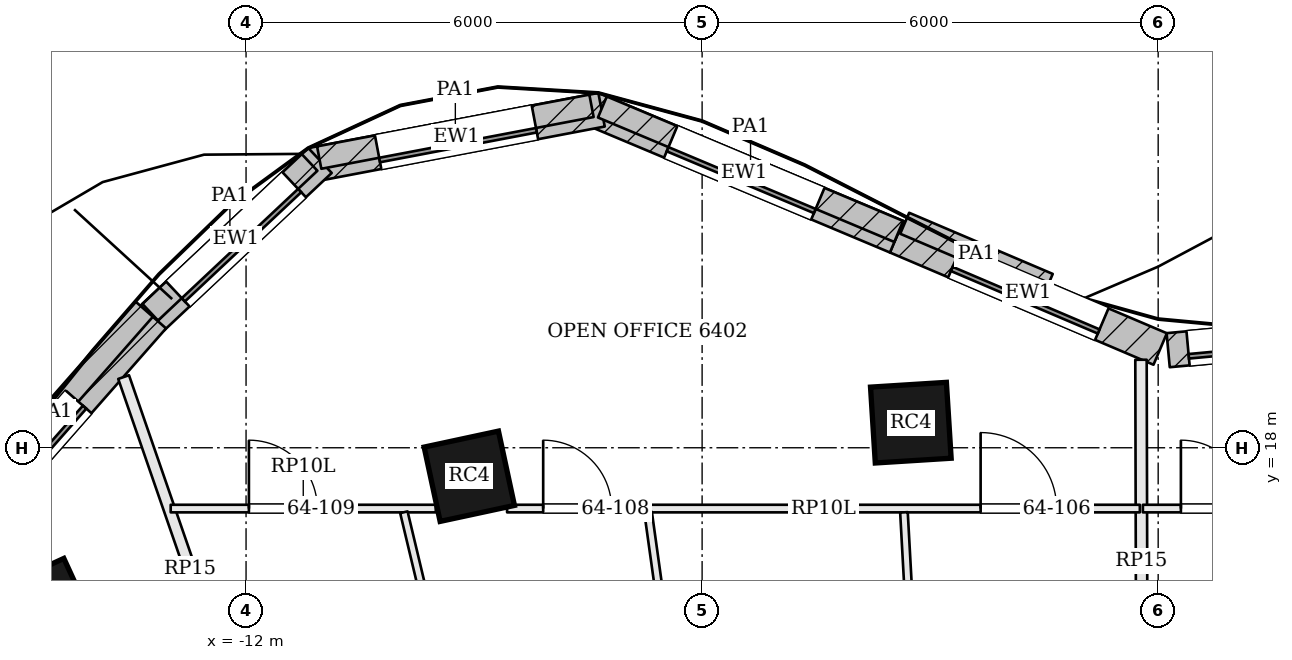
"""IFC4 building model, lengths in metres.
Left out: names, types, materials, properties, quantities, classifications, styles, units other than length and angle.
Written with IfcOpenShell. Run it as: python <this file> out.ifc"""

import sys

from ifc_helpers import new_model, si_unit, direction, frame, frame_2d, origin, origin_2d, place, context, subcontext, project, spatial, rectangle, extrude, element, fill, save


model = new_model("IFC4")
c1 = context("Model", 3, precision=1e-05, world=origin(), true_north=direction((0.0, 1.0)))
c2 = subcontext(c1, "Body", "Model", "MODEL_VIEW")
j1 = project(units=[si_unit("LENGTHUNIT", "METRE"), si_unit("PLANEANGLEUNIT", "RADIAN")], contexts=[c1])
p1 = place(None, origin())
s1 = spatial("IfcSite", under=j1, at=p1, CompositionType="ELEMENT")
p2 = place(p1, origin())
s2 = spatial("IfcBuilding", under=s1, at=p2, CompositionType="ELEMENT")
p3 = place(p2, frame((0.0, 0.0, 260.4)))
s3 = spatial("IfcBuildingStorey", under=s2, at=p3, CompositionType="ELEMENT", Elevation=260.4)
for number, where, z_axis, x_axis in (
    (1, (-3.254, 18.33, 0.0), (0.0, 0.0, 1.0), (-0.998, -0.063, 0.0)),
    (2, (-9.063, 17.625, 0.0), (0.0, 0.0, 1.0), (-0.978, -0.21, 0.0)),
    (3, (-14.643, 15.881, 0.0), (0.0, 0.0, 1.0), (-0.909, -0.417, 0.0)),
):
    element("IfcColumn", number, at=place(p3, frame(where, z_axis=z_axis, x_axis=x_axis)), inside=s3, PredefinedType="COLUMN", context=c2, shape_type="SweptSolid", body=[
        extrude(rectangle(XDim=1.0, YDim=1.0, at=origin_2d()), origin(), (0.0, 0.0, 1.0), 3.1),
    ])
p4 = place(p3, frame((2.745, 19.525, 0.0), z_axis=(0.0, 0.0, 1.0), x_axis=(-0.995768774275, -0.091894222771, 0.0)))
e4 = element("IfcWall", 4, at=p4, inside=s3, PredefinedType="SOLIDWALL", context=c2, shape_type="SweptSolid", body=[
    extrude(rectangle(XDim=2.625, YDim=0.45, at=frame_2d((1.312, 0.0))), origin(), (0.0, 0.0, 1.0), 3.6),
])
p5 = place(p4, frame((0.262, 0.0, 0.9)))
e5 = element("IfcOpeningElement", 5, at=p5, cuts=e4, PredefinedType="OPENING", context=c2, shape_type="SweptSolid", body=[
    extrude(rectangle(XDim=2.1, YDim=1.8, at=frame_2d((1.05, 0.9))), frame((0.0, 0.235, 0.0), z_axis=(0.0, -1.0, 0.0), x_axis=(1.0, 0.0, 0.0)), (0.0, 0.0, 1.0), 0.47),
])
p6 = place(p3, frame((0.026, 19.299, 0.0), z_axis=(0.0, 0.0, 1.0), x_axis=(-0.920040408927, 0.391823488245, 0.0)))
e6 = element("IfcWall", 6, at=p6, inside=s3, PredefinedType="SOLIDWALL", context=c2, shape_type="SweptSolid", body=[
    extrude(rectangle(XDim=3.77, YDim=0.45, at=frame_2d((1.885, 0.0))), origin(), (0.0, 0.0, 1.0), 3.6),
])
p7 = place(p6, frame((0.835, 0.0, 0.9)))
e7 = element("IfcOpeningElement", 7, at=p7, cuts=e6, PredefinedType="OPENING", context=c2, shape_type="SweptSolid", body=[
    extrude(rectangle(XDim=2.1, YDim=1.8, at=frame_2d((1.05, 0.9))), frame((0.0, 0.235, 0.0), z_axis=(0.0, -1.0, 0.0), x_axis=(1.0, 0.0, 0.0)), (0.0, 0.0, 1.0), 0.47),
])
p8 = place(p3, frame((-3.441, 20.776, 0.0), z_axis=(0.0, 0.0, 1.0), x_axis=(-0.921988121387, 0.387218160758, 0.0)))
e8 = element("IfcWall", 8, at=p8, inside=s3, PredefinedType="SOLIDWALL", context=c2, shape_type="SweptSolid", body=[
    extrude(rectangle(XDim=4.347, YDim=0.45, at=frame_2d((2.173, 0.0))), origin(), (0.0, 0.0, 1.0), 3.6),
])
p9 = place(p8, frame((1.123, 0.0, 0.9)))
e9 = element("IfcOpeningElement", 9, at=p9, cuts=e8, PredefinedType="OPENING", context=c2, shape_type="SweptSolid", body=[
    extrude(rectangle(XDim=2.1, YDim=1.8, at=frame_2d((1.05, 0.9))), frame((0.0, 0.235, 0.0), z_axis=(0.0, -1.0, 0.0), x_axis=(1.0, 0.0, 0.0)), (0.0, 0.0, 1.0), 0.47),
])
p10 = place(p3, frame((-7.323, 22.447, 0.0), z_axis=(0.0, 0.0, 1.0), x_axis=(-0.982420993638, -0.18667884524, 0.0)))
e10 = element("IfcWall", 10, at=p10, inside=s3, PredefinedType="SOLIDWALL", context=c2, shape_type="SweptSolid", body=[
    extrude(rectangle(XDim=3.884, YDim=0.45, at=frame_2d((1.942, 0.0))), origin(), (0.0, 0.0, 1.0), 3.6),
])
p11 = place(p10, frame((0.892, 0.0, 0.9)))
e11 = element("IfcOpeningElement", 11, at=p11, cuts=e10, PredefinedType="OPENING", context=c2, shape_type="SweptSolid", body=[
    extrude(rectangle(XDim=2.1, YDim=1.8, at=frame_2d((1.05, 0.9))), frame((0.0, 0.235, 0.0), z_axis=(0.0, -1.0, 0.0), x_axis=(1.0, 0.0, 0.0)), (0.0, 0.0, 1.0), 0.47),
])
p12 = place(p3, frame((-11.027, 21.779, 0.0), z_axis=(0.0, 0.0, 1.0), x_axis=(-0.728871214251, -0.684650825631, 0.0)))
e12 = element("IfcWall", 12, at=p12, inside=s3, PredefinedType="SOLIDWALL", context=c2, shape_type="SweptSolid", body=[
    extrude(rectangle(XDim=3.031, YDim=0.45, at=frame_2d((1.516, 0.0))), origin(), (0.0, 0.0, 1.0), 3.6),
])
p13 = place(p12, frame((0.466, 0.0, 0.9)))
e13 = element("IfcOpeningElement", 13, at=p13, cuts=e12, PredefinedType="OPENING", context=c2, shape_type="SweptSolid", body=[
    extrude(rectangle(XDim=2.1, YDim=1.8, at=frame_2d((1.05, 0.9))), frame((0.0, 0.235, 0.0), z_axis=(0.0, -1.0, 0.0), x_axis=(1.0, 0.0, 0.0)), (0.0, 0.0, 1.0), 0.47),
])
p14 = place(p3, frame((-13.221, 19.719, 0.0), z_axis=(0.0, 0.0, 1.0), x_axis=(-0.660424908916, -0.750892095899, 0.0)))
e14 = element("IfcWall", 14, at=p14, inside=s3, PredefinedType="SOLIDWALL", context=c2, shape_type="SweptSolid", body=[
    extrude(rectangle(XDim=5.071, YDim=0.45, at=frame_2d((2.535, 0.0))), origin(), (0.0, 0.0, 1.0), 3.6),
])
p15 = place(p14, frame((1.485, 0.0, 0.9)))
e15 = element("IfcOpeningElement", 15, at=p15, cuts=e14, PredefinedType="OPENING", context=c2, shape_type="SweptSolid", body=[
    extrude(rectangle(XDim=2.1, YDim=1.8, at=frame_2d((1.05, 0.9))), frame((0.0, 0.235, 0.0), z_axis=(0.0, -1.0, 0.0), x_axis=(1.0, 0.0, 0.0)), (0.0, 0.0, 1.0), 0.47),
])
p16 = place(p3, frame((-1.446, 20.149, 3.9), z_axis=(0.0, 0.0, 1.0), x_axis=(-0.920058903695, 0.391780057854, 0.0)))
e16 = element("IfcWall", 16, at=p16, inside=s3, PredefinedType="PARAPET", context=c2, shape_type="SweptSolid", body=[
    extrude(rectangle(XDim=2.053, YDim=0.3, at=frame_2d((1.027, 0.0))), origin(), (0.0, 0.0, 1.0), 1.1),
])
p17 = place(p3, frame((-3.413, 20.846, 3.9), z_axis=(0.0, 0.0, 1.0), x_axis=(-0.921981693349, 0.387233465921, 0.0)))
e17 = element("IfcWall", 17, at=p17, inside=s3, PredefinedType="PARAPET", context=c2, shape_type="SweptSolid", body=[
    extrude(rectangle(XDim=4.229, YDim=0.3, at=frame_2d((2.114, 0.0))), origin(), (0.0, 0.0, 1.0), 1.1),
])
p18 = place(p3, frame((-7.455, 22.498, 3.9), z_axis=(0.0, 0.0, 1.0), x_axis=(-0.982412909305, -0.186721385038, 0.0)))
e18 = element("IfcWall", 18, at=p18, inside=s3, PredefinedType="PARAPET", context=c2, shape_type="SweptSolid", body=[
    extrude(rectangle(XDim=3.647, YDim=0.3, at=frame_2d((1.823, 0.0))), origin(), (0.0, 0.0, 1.0), 1.1),
])
p19 = place(p3, frame((-11.164, 21.753, 3.9), z_axis=(0.0, 0.0, 1.0), x_axis=(-0.72886475222, -0.684657704967, 0.0)))
e19 = element("IfcWall", 19, at=p19, inside=s3, PredefinedType="PARAPET", context=c2, shape_type="SweptSolid", body=[
    extrude(rectangle(XDim=2.877, YDim=0.3, at=frame_2d((1.438, 0.0))), origin(), (0.0, 0.0, 1.0), 1.1),
])
p20 = place(p3, frame((-13.339, 19.822, 3.9), z_axis=(0.0, 0.0, 1.0), x_axis=(-0.660443655688, -0.750875607316, 0.0)))
e20 = element("IfcWall", 20, at=p20, inside=s3, PredefinedType="PARAPET", context=c2, shape_type="SweptSolid", body=[
    extrude(rectangle(XDim=3.615, YDim=0.3, at=frame_2d((1.808, 0.0))), origin(), (0.0, 0.0, 1.0), 1.1),
])
p21 = place(p3, frame((-0.226, 19.158, 0.0), z_axis=(0.0, 0.0, 1.0), x_axis=(0.002541816357, -0.99999676958, 0.0)))
e21 = element("IfcWall", 21, at=p21, inside=s3, PredefinedType="PARTITIONING", context=c2, shape_type="SweptSolid", body=[
    extrude(rectangle(XDim=5.283, YDim=0.15, at=frame_2d((2.641, 0.0))), origin(), (0.0, 0.0, 1.0), 2.984),
])
p22 = place(p3, frame((-13.611, 18.93, 0.0), z_axis=(0.0, 0.0, 1.0), x_axis=(0.326825455095, -0.945084716786, 0.0)))
e22 = element("IfcWall", 22, at=p22, inside=s3, PredefinedType="PARTITIONING", context=c2, shape_type="SweptSolid", body=[
    extrude(rectangle(XDim=5.353, YDim=0.15, at=frame_2d((2.677, 0.0))), origin(), (0.0, 0.0, 1.0), 2.984),
])
p23 = place(p3, frame((-0.201, 17.2, 0.0), z_axis=(0.0, 0.0, 1.0), x_axis=(1.0, 0.0, 0.0)))
e23 = element("IfcWall", 23, at=p23, inside=s3, PredefinedType="PARTITIONING", context=c2, shape_type="SweptSolid", body=[
    extrude(rectangle(XDim=8.722, YDim=0.1, at=frame_2d((4.361, 0.0))), origin(), (0.0, 0.0, 1.0), 2.58),
])
p24 = place(p23, frame((0.5, 0.0, 0.0)))
e24 = element("IfcOpeningElement", 24, at=p24, cuts=e23, PredefinedType="OPENING", context=c2, shape_type="SweptSolid", body=[
    extrude(rectangle(XDim=0.9, YDim=2.1, at=frame_2d((0.45, 1.05))), frame((0.0, 0.06, 0.0), z_axis=(0.0, -1.0, 0.0), x_axis=(1.0, 0.0, 0.0)), (0.0, 0.0, 1.0), 0.12),
])
p25 = place(p3, frame((-12.991, 17.2, 0.0), z_axis=(0.0, 0.0, 1.0), x_axis=(1.0, 0.0, 0.0)))
e25 = element("IfcWall", 25, at=p25, inside=s3, PredefinedType="PARTITIONING", context=c2, shape_type="SweptSolid", body=[
    extrude(rectangle(XDim=3.488, YDim=0.1, at=frame_2d((1.744, 0.0))), origin(), (0.0, 0.0, 1.0), 2.58),
])
p26 = place(p25, frame((1.029, 0.0, 0.0)))
e26 = element("IfcOpeningElement", 26, at=p26, cuts=e25, PredefinedType="OPENING", context=c2, shape_type="SweptSolid", body=[
    extrude(rectangle(XDim=0.9, YDim=2.1, at=frame_2d((0.45, 1.05))), frame((0.0, 0.06, 0.0), z_axis=(0.0, -1.0, 0.0), x_axis=(1.0, 0.0, 0.0)), (0.0, 0.0, 1.0), 0.12),
])
p27 = place(p3, frame((-8.566, 17.2, 0.0), z_axis=(0.0, 0.0, 1.0), x_axis=(1.0, 0.0, 0.0)))
e27 = element("IfcWall", 27, at=p27, inside=s3, PredefinedType="PARTITIONING", context=c2, shape_type="SweptSolid", body=[
    extrude(rectangle(XDim=8.325, YDim=0.1, at=frame_2d((4.162, 0.0))), origin(), (0.0, 0.0, 1.0), 2.58),
])
p28 = place(p27, frame((6.23, 0.0, 0.0)))
e28 = element("IfcOpeningElement", 28, at=p28, cuts=e27, PredefinedType="OPENING", context=c2, shape_type="SweptSolid", body=[
    extrude(rectangle(XDim=1.0, YDim=2.1, at=frame_2d((0.5, 1.05))), frame((0.0, 0.06, 0.0), z_axis=(0.0, -1.0, 0.0), x_axis=(1.0, 0.0, 0.0)), (0.0, 0.0, 1.0), 0.12),
])
p29 = place(p27, frame((0.475, 0.0, 0.0)))
e29 = element("IfcOpeningElement", 29, at=p29, cuts=e27, PredefinedType="OPENING", context=c2, shape_type="SweptSolid", body=[
    extrude(rectangle(XDim=0.9, YDim=2.1, at=frame_2d((0.45, 1.05))), frame((0.0, 0.06, 0.0), z_axis=(0.0, -1.0, 0.0), x_axis=(1.0, 0.0, 0.0)), (0.0, 0.0, 1.0), 0.12),
])
p30 = place(p3, frame((-3.165, 13.875, 0.0), z_axis=(0.0, 0.0, 1.0), x_axis=(-0.054855780122, 0.998494288109, 0.0)))
e30 = element("IfcWall", 30, at=p30, inside=s3, PredefinedType="PARTITIONING", context=c2, shape_type="SweptSolid", body=[
    extrude(rectangle(XDim=3.28, YDim=0.1, at=frame_2d((1.64, 0.0))), origin(), (0.0, 0.0, 1.0), 2.984),
])
p31 = place(p3, frame((-6.254, 13.874, 0.0), z_axis=(0.0, 0.0, 1.0), x_axis=(-0.137948523614, 0.990439399879, 0.0)))
e31 = element("IfcWall", 31, at=p31, inside=s3, PredefinedType="PARTITIONING", context=c2, shape_type="SweptSolid", body=[
    extrude(rectangle(XDim=3.308, YDim=0.1, at=frame_2d((1.654, 0.0))), origin(), (0.0, 0.0, 1.0), 2.984),
])
p32 = place(p3, frame((-9.14, 13.873, 0.0), z_axis=(0.0, 0.0, 1.0), x_axis=(-0.232348315027, 0.97263264417, 0.0)))
e32 = element("IfcWall", 32, at=p32, inside=s3, PredefinedType="PARTITIONING", context=c2, shape_type="SweptSolid", body=[
    extrude(rectangle(XDim=3.371, YDim=0.1, at=frame_2d((1.686, 0.0))), origin(), (0.0, 0.0, 1.0), 2.58),
])
p33 = place(p5, origin())
e33 = element("IfcWindow", 33, at=p33, inside=s3, PartitioningType="SINGLE_PANEL", PredefinedType="WINDOW", context=c2, shape_type="SweptSolid", body=[
    extrude(rectangle(XDim=2.1, YDim=1.8, at=frame_2d((1.05, 0.9))), frame((0.0, 0.135, 0.0), z_axis=(0.0, -1.0, 0.0), x_axis=(1.0, 0.0, 0.0)), (0.0, 0.0, 1.0), 0.06),
])
fill(e5, e33)
p34 = place(p7, origin())
e34 = element("IfcWindow", 34, at=p34, inside=s3, PartitioningType="SINGLE_PANEL", PredefinedType="WINDOW", context=c2, shape_type="SweptSolid", body=[
    extrude(rectangle(XDim=2.1, YDim=1.8, at=frame_2d((1.05, 0.9))), frame((0.0, 0.135, 0.0), z_axis=(0.0, -1.0, 0.0), x_axis=(1.0, 0.0, 0.0)), (0.0, 0.0, 1.0), 0.06),
])
fill(e7, e34)
p35 = place(p9, origin())
e35 = element("IfcWindow", 35, at=p35, inside=s3, PartitioningType="SINGLE_PANEL", PredefinedType="WINDOW", context=c2, shape_type="SweptSolid", body=[
    extrude(rectangle(XDim=2.1, YDim=1.8, at=frame_2d((1.05, 0.9))), frame((0.0, 0.135, 0.0), z_axis=(0.0, -1.0, 0.0), x_axis=(1.0, 0.0, 0.0)), (0.0, 0.0, 1.0), 0.06),
])
fill(e9, e35)
p36 = place(p11, origin())
e36 = element("IfcWindow", 36, at=p36, inside=s3, PartitioningType="SINGLE_PANEL", PredefinedType="WINDOW", context=c2, shape_type="SweptSolid", body=[
    extrude(rectangle(XDim=2.1, YDim=1.8, at=frame_2d((1.05, 0.9))), frame((0.0, 0.135, 0.0), z_axis=(0.0, -1.0, 0.0), x_axis=(1.0, 0.0, 0.0)), (0.0, 0.0, 1.0), 0.06),
])
fill(e11, e36)
p37 = place(p13, origin())
e37 = element("IfcWindow", 37, at=p37, inside=s3, PartitioningType="SINGLE_PANEL", PredefinedType="WINDOW", context=c2, shape_type="SweptSolid", body=[
    extrude(rectangle(XDim=2.1, YDim=1.8, at=frame_2d((1.05, 0.9))), frame((0.0, 0.135, 0.0), z_axis=(0.0, -1.0, 0.0), x_axis=(1.0, 0.0, 0.0)), (0.0, 0.0, 1.0), 0.06),
])
fill(e13, e37)
p38 = place(p15, origin())
e38 = element("IfcWindow", 38, at=p38, inside=s3, PartitioningType="SINGLE_PANEL", PredefinedType="WINDOW", context=c2, shape_type="SweptSolid", body=[
    extrude(rectangle(XDim=2.1, YDim=1.8, at=frame_2d((1.05, 0.9))), frame((0.0, 0.135, 0.0), z_axis=(0.0, -1.0, 0.0), x_axis=(1.0, 0.0, 0.0)), (0.0, 0.0, 1.0), 0.06),
])
fill(e15, e38)
p39 = place(p24, origin())
e39 = element("IfcDoor", 39, at=p39, inside=s3, OperationType="SINGLE_SWING_LEFT", PredefinedType="DOOR", context=c2, shape_type="SweptSolid", body=[
    extrude(rectangle(XDim=0.9, YDim=2.1, at=frame_2d((0.45, 1.05))), frame((0.0, 0.025, 0.0), z_axis=(0.0, -1.0, 0.0), x_axis=(1.0, 0.0, 0.0)), (0.0, 0.0, 1.0), 0.05),
])
fill(e24, e39)
p40 = place(p28, origin())
e40 = element("IfcDoor", 40, at=p40, inside=s3, OperationType="SINGLE_SWING_LEFT", PredefinedType="DOOR", context=c2, shape_type="SweptSolid", body=[
    extrude(rectangle(XDim=1.0, YDim=2.1, at=frame_2d((0.5, 1.05))), frame((0.0, 0.025, 0.0), z_axis=(0.0, -1.0, 0.0), x_axis=(1.0, 0.0, 0.0)), (0.0, 0.0, 1.0), 0.05),
])
fill(e28, e40)
p41 = place(p29, origin())
e41 = element("IfcDoor", 41, at=p41, inside=s3, OperationType="SINGLE_SWING_LEFT", PredefinedType="DOOR", context=c2, shape_type="SweptSolid", body=[
    extrude(rectangle(XDim=0.9, YDim=2.1, at=frame_2d((0.45, 1.05))), frame((0.0, 0.025, 0.0), z_axis=(0.0, -1.0, 0.0), x_axis=(1.0, 0.0, 0.0)), (0.0, 0.0, 1.0), 0.05),
])
fill(e29, e41)
p42 = place(p26, origin())
e42 = element("IfcDoor", 42, at=p42, inside=s3, OperationType="SINGLE_SWING_LEFT", PredefinedType="DOOR", context=c2, shape_type="SweptSolid", body=[
    extrude(rectangle(XDim=0.9, YDim=2.1, at=frame_2d((0.45, 1.05))), frame((0.0, 0.025, 0.0), z_axis=(0.0, -1.0, 0.0), x_axis=(1.0, 0.0, 0.0)), (0.0, 0.0, 1.0), 0.05),
])
fill(e26, e42)
save(model, sys.argv[1])
